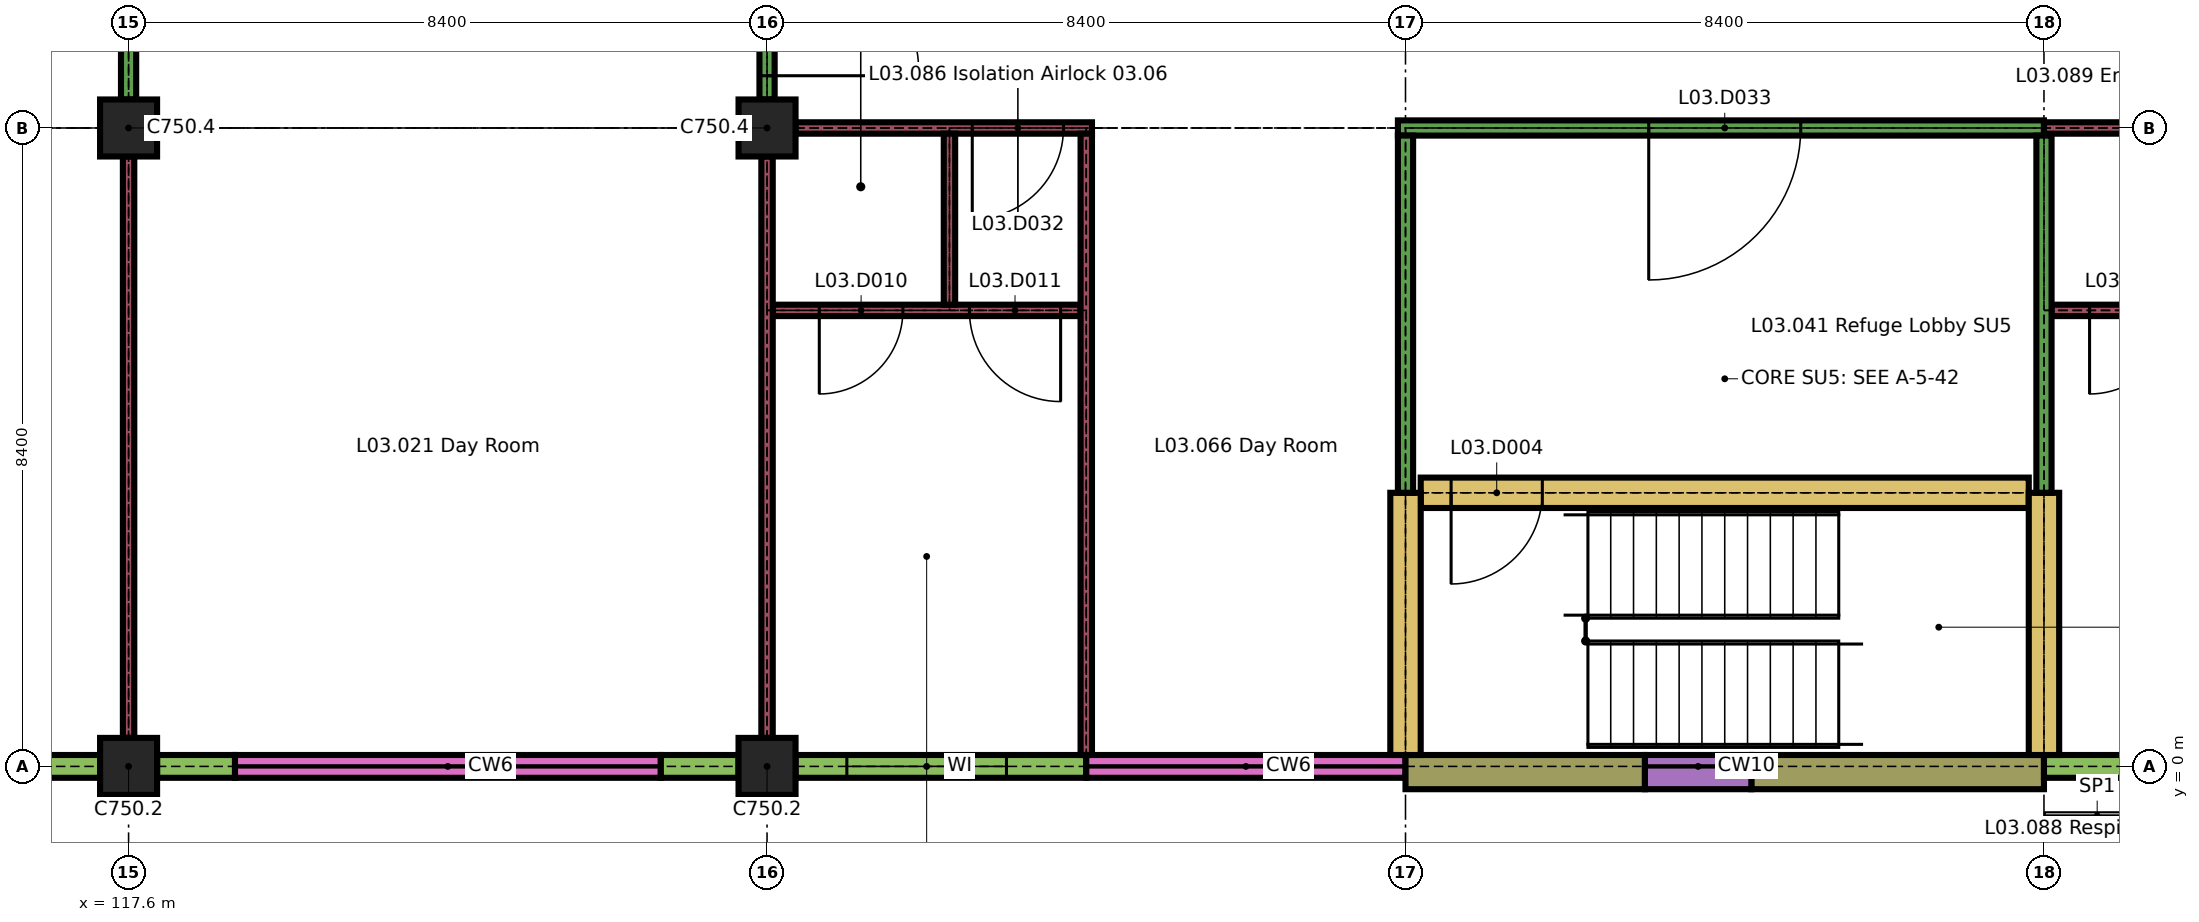
"""IFC4 building model, lengths in metres.
Left out: names, types, materials, properties, quantities, classifications, styles, units other than length and angle.
Written with IfcOpenShell. Run it as: python <this file> out.ifc"""

import sys

from ifc_helpers import new_model, si_unit, direction, frame, frame_2d, origin, origin_2d, place, context, subcontext, project, spatial, rectangle, extrude, element, fill, save


model = new_model("IFC4")
c1 = context("Model", 3, precision=1e-05, world=origin(), true_north=direction((0.0, 1.0)))
c2 = subcontext(c1, "Body", "Model", "MODEL_VIEW")
j1 = project(units=[si_unit("LENGTHUNIT", "METRE"), si_unit("PLANEANGLEUNIT", "RADIAN")], contexts=[c1])
p1 = place(None, origin())
s1 = spatial("IfcSite", under=j1, at=p1, CompositionType="ELEMENT")
p2 = place(p1, origin())
s2 = spatial("IfcBuilding", under=s1, at=p2, CompositionType="ELEMENT")
p3 = place(p2, frame((0.0, 0.0, 15.3)))
s3 = spatial("IfcBuildingStorey", under=s2, at=p3, CompositionType="ELEMENT", Elevation=15.3)
for number, where, z_axis, x_axis in (
    (1, (117.6, 0.0, 0.0), (0.0, 0.0, 1.0), (1.0, 0.0, 0.0)),
    (2, (126.0, 0.0, 0.0), (0.0, 0.0, 1.0), (1.0, 0.0, 0.0)),
    (3, (117.6, 8.4, 0.0), (0.0, 0.0, 1.0), (1.0, 0.0, 0.0)),
    (4, (126.0, 8.4, 0.0), (0.0, 0.0, 1.0), (1.0, 0.0, 0.0)),
):
    element("IfcColumn", number, at=place(p3, frame(where, z_axis=z_axis, x_axis=x_axis)), inside=s3, PredefinedType="COLUMN", context=c2, shape_type="SweptSolid", body=[
        extrude(rectangle(XDim=0.75, YDim=0.75, at=origin_2d()), origin(), (0.0, 0.0, 1.0), 3.26),
    ])
p4 = place(p3, frame((116.1, 0.0, 0.0), z_axis=(0.0, 0.0, 1.0), x_axis=(1.0, 0.0, 0.0)))
e5 = element("IfcWall", 5, at=p4, inside=s3, PredefinedType="SOLIDWALL", context=c2, shape_type="SweptSolid", body=[
    extrude(rectangle(XDim=1.125, YDim=0.3, at=frame_2d((0.562, 0.0))), origin(), (0.0, 0.0, 1.0), 2.96),
])
for number, where, z_axis, x_axis in (
    (6, (117.975, 0.0, 0.0), (0.0, 0.0, 1.0), (1.0, 0.0, 0.0)),
    (7, (124.6, 0.0, 0.0), (0.0, 0.0, 1.0), (1.0, 0.0, 0.0)),
):
    element("IfcWall", number, at=place(p3, frame(where, z_axis=z_axis, x_axis=x_axis)), inside=s3, PredefinedType="SOLIDWALL", context=c2, shape_type="SweptSolid", body=[
        extrude(rectangle(XDim=1.025, YDim=0.3, at=frame_2d((0.512, 0.0))), origin(), (0.0, 0.0, 1.0), 2.96),
    ])
p5 = place(p3, frame((119.0, 0.0, 0.0), z_axis=(0.0, 0.0, 1.0), x_axis=(1.0, 0.0, 0.0)))
e8 = element("IfcWall", 8, at=p5, inside=s3, PredefinedType="SOLIDWALL", context=c2, shape_type="SweptSolid", body=[
    extrude(rectangle(XDim=5.6, YDim=0.3, at=frame_2d((2.8, 0.0))), origin(), (0.0, 0.0, 1.0), 0.6),
])
p6 = place(p3, frame((126.375, 0.0, 0.0), z_axis=(0.0, 0.0, 1.0), x_axis=(1.0, 0.0, 0.0)))
e9 = element("IfcWall", 9, at=p6, inside=s3, PredefinedType="SOLIDWALL", context=c2, shape_type="SweptSolid", body=[
    extrude(rectangle(XDim=3.825, YDim=0.3, at=frame_2d((1.913, 0.0))), origin(), (0.0, 0.0, 1.0), 2.96),
])
p7 = place(p6, frame((0.675, 0.0, 0.9)))
e10 = element("IfcOpeningElement", 10, at=p7, cuts=e9, PredefinedType="OPENING", context=c2, shape_type="SweptSolid", body=[
    extrude(rectangle(XDim=2.1, YDim=1.5, at=frame_2d((1.05, 0.75))), frame((0.0, 0.16, 0.0), z_axis=(0.0, -1.0, 0.0), x_axis=(1.0, 0.0, 0.0)), (0.0, 0.0, 1.0), 0.32),
])
p8 = place(p3, frame((130.2, 0.0, 0.0), z_axis=(0.0, 0.0, 1.0), x_axis=(1.0, 0.0, 0.0)))
e11 = element("IfcWall", 11, at=p8, inside=s3, PredefinedType="SOLIDWALL", context=c2, shape_type="SweptSolid", body=[
    extrude(rectangle(XDim=4.2, YDim=0.3, at=frame_2d((2.1, 0.0))), origin(), (0.0, 0.0, 1.0), 0.6),
])
p9 = place(p3, frame((134.4, -0.075, 0.0), z_axis=(0.0, 0.0, 1.0), x_axis=(1.0, 0.0, 0.0)))
e12 = element("IfcWall", 12, at=p9, inside=s3, PredefinedType="SOLIDWALL", context=c2, shape_type="SweptSolid", body=[
    extrude(rectangle(XDim=3.15, YDim=0.45, at=frame_2d((1.575, 0.0))), origin(), (0.0, 0.0, 1.0), 3.26),
])
p10 = place(p3, frame((138.95, -0.075, 0.0), z_axis=(0.0, 0.0, 1.0), x_axis=(1.0, 0.0, 0.0)))
e13 = element("IfcWall", 13, at=p10, inside=s3, PredefinedType="SOLIDWALL", context=c2, shape_type="SweptSolid", body=[
    extrude(rectangle(XDim=3.85, YDim=0.45, at=frame_2d((1.925, 0.0))), origin(), (0.0, 0.0, 1.0), 3.26),
])
p11 = place(p3, frame((137.55, -0.075, 0.0), z_axis=(0.0, 0.0, 1.0), x_axis=(1.0, 0.0, 0.0)))
e14 = element("IfcWall", 14, at=p11, inside=s3, PredefinedType="SOLIDWALL", context=c2, shape_type="SweptSolid", body=[
    extrude(rectangle(XDim=1.4, YDim=0.45, at=frame_2d((0.7, 0.0))), origin(), (0.0, 0.0, 1.0), 0.6),
])
p12 = place(p3, frame((142.8, 0.0, 0.0), z_axis=(0.0, 0.0, 1.0), x_axis=(1.0, 0.0, 0.0)))
e15 = element("IfcWall", 15, at=p12, inside=s3, PredefinedType="SOLIDWALL", context=c2, shape_type="SweptSolid", body=[
    extrude(rectangle(XDim=4.2, YDim=0.3, at=frame_2d((2.1, 0.0))), origin(), (0.0, 0.0, 1.0), 2.96),
])
p13 = place(p12, frame((1.05, 0.0, 0.9)))
e16 = element("IfcOpeningElement", 16, at=p13, cuts=e15, PredefinedType="OPENING", context=c2, shape_type="SweptSolid", body=[
    extrude(rectangle(XDim=2.1, YDim=1.5, at=frame_2d((1.05, 0.75))), frame((0.0, 0.16, 0.0), z_axis=(0.0, -1.0, 0.0), x_axis=(1.0, 0.0, 0.0)), (0.0, 0.0, 1.0), 0.32),
])
p14 = place(p3, frame((134.6, 3.6, 0.0), z_axis=(0.0, 0.0, 1.0), x_axis=(1.0, 0.0, 0.0)))
e17 = element("IfcWall", 17, at=p14, inside=s3, PredefinedType="SHEAR", context=c2, shape_type="SweptSolid", body=[
    extrude(rectangle(XDim=8.0, YDim=0.4, at=frame_2d((4.0, 0.0))), origin(), (0.0, 0.0, 1.0), 3.26),
])
p15 = place(p14, frame((0.4, 0.0, 0.0)))
e18 = element("IfcOpeningElement", 18, at=p15, cuts=e17, PredefinedType="OPENING", context=c2, shape_type="SweptSolid", body=[
    extrude(rectangle(XDim=1.2, YDim=2.1, at=frame_2d((0.6, 1.05))), frame((0.0, 0.21, 0.0), z_axis=(0.0, -1.0, 0.0), x_axis=(1.0, 0.0, 0.0)), (0.0, 0.0, 1.0), 0.42),
])
p16 = place(p3, frame((126.075, 6.0, 0.0), z_axis=(0.0, 0.0, 1.0), x_axis=(1.0, 0.0, 0.0)))
e19 = element("IfcWall", 19, at=p16, inside=s3, PredefinedType="PARTITIONING", context=c2, shape_type="SweptSolid", body=[
    extrude(rectangle(XDim=4.05, YDim=0.15, at=frame_2d((2.025, 0.0))), origin(), (0.0, 0.0, 1.0), 3.26),
])
p17 = place(p16, frame((0.613, 0.0, 0.0)))
e20 = element("IfcOpeningElement", 20, at=p17, cuts=e19, PredefinedType="OPENING", context=c2, shape_type="SweptSolid", body=[
    extrude(rectangle(XDim=1.1, YDim=2.1, at=frame_2d((0.55, 1.05))), frame((0.0, 0.085, 0.0), z_axis=(0.0, -1.0, 0.0), x_axis=(1.0, 0.0, 0.0)), (0.0, 0.0, 1.0), 0.17),
])
p18 = place(p16, frame((2.587, 0.0, 0.0)))
e21 = element("IfcOpeningElement", 21, at=p18, cuts=e19, PredefinedType="OPENING", context=c2, shape_type="SweptSolid", body=[
    extrude(rectangle(XDim=1.2, YDim=2.1, at=frame_2d((0.6, 1.05))), frame((0.0, 0.085, 0.0), z_axis=(0.0, -1.0, 0.0), x_axis=(1.0, 0.0, 0.0)), (0.0, 0.0, 1.0), 0.17),
])
p19 = place(p3, frame((142.9, 6.0, 0.0), z_axis=(0.0, 0.0, 1.0), x_axis=(1.0, 0.0, 0.0)))
e22 = element("IfcWall", 22, at=p19, inside=s3, PredefinedType="PARTITIONING", context=c2, shape_type="SweptSolid", body=[
    extrude(rectangle(XDim=2.175, YDim=0.15, at=frame_2d((1.087, 0.0))), origin(), (0.0, 0.0, 1.0), 3.26),
])
p20 = place(p19, frame((0.5, 0.0, 0.0)))
e23 = element("IfcOpeningElement", 23, at=p20, cuts=e22, PredefinedType="OPENING", context=c2, shape_type="SweptSolid", body=[
    extrude(rectangle(XDim=1.1, YDim=2.1, at=frame_2d((0.55, 1.05))), frame((0.0, 0.085, 0.0), z_axis=(0.0, -1.0, 0.0), x_axis=(1.0, 0.0, 0.0)), (0.0, 0.0, 1.0), 0.17),
])
p21 = place(p3, frame((126.375, 8.4, 0.0), z_axis=(0.0, 0.0, 1.0), x_axis=(1.0, 0.0, 0.0)))
e24 = element("IfcWall", 24, at=p21, inside=s3, PredefinedType="PARTITIONING", context=c2, shape_type="SweptSolid", body=[
    extrude(rectangle(XDim=3.9, YDim=0.15, at=frame_2d((1.95, 0.0))), origin(), (0.0, 0.0, 1.0), 3.26),
])
p22 = place(p21, frame((2.325, 0.0, 0.0)))
e25 = element("IfcOpeningElement", 25, at=p22, cuts=e24, PredefinedType="OPENING", context=c2, shape_type="SweptSolid", body=[
    extrude(rectangle(XDim=1.2, YDim=2.1, at=frame_2d((0.6, 1.05))), frame((0.0, 0.085, 0.0), z_axis=(0.0, -1.0, 0.0), x_axis=(1.0, 0.0, 0.0)), (0.0, 0.0, 1.0), 0.17),
])
p23 = place(p3, frame((134.3, 8.4, 0.0), z_axis=(0.0, 0.0, 1.0), x_axis=(1.0, 0.0, 0.0)))
e26 = element("IfcWall", 26, at=p23, inside=s3, PredefinedType="PARTITIONING", context=c2, shape_type="SweptSolid", body=[
    extrude(rectangle(XDim=8.5, YDim=0.2, at=frame_2d((4.25, 0.0))), origin(), (0.0, 0.0, 1.0), 3.26),
])
p24 = place(p23, frame((3.3, 0.0, 0.0)))
e27 = element("IfcOpeningElement", 27, at=p24, cuts=e26, PredefinedType="OPENING", context=c2, shape_type="SweptSolid", body=[
    extrude(rectangle(XDim=2.0, YDim=2.4, at=frame_2d((1.0, 1.2))), frame((0.0, 0.11, 0.0), z_axis=(0.0, -1.0, 0.0), x_axis=(1.0, 0.0, 0.0)), (0.0, 0.0, 1.0), 0.22),
])
p25 = place(p3, frame((142.8, 8.4, 0.0), z_axis=(0.0, 0.0, 1.0), x_axis=(1.0, 0.0, 0.0)))
e28 = element("IfcWall", 28, at=p25, inside=s3, PredefinedType="PARTITIONING", context=c2, shape_type="SweptSolid", body=[
    extrude(rectangle(XDim=8.05, YDim=0.15, at=frame_2d((4.025, 0.0))), origin(), (0.0, 0.0, 1.0), 3.26),
])
p26 = place(p25, frame((2.45, 0.0, 0.0)))
e29 = element("IfcOpeningElement", 29, at=p26, cuts=e28, PredefinedType="OPENING", context=c2, shape_type="SweptSolid", body=[
    extrude(rectangle(XDim=1.5, YDim=2.4, at=frame_2d((0.75, 1.2))), frame((0.0, 0.085, 0.0), z_axis=(0.0, -1.0, 0.0), x_axis=(1.0, 0.0, 0.0)), (0.0, 0.0, 1.0), 0.17),
])
p27 = place(p25, frame((4.5, 0.0, 0.0)))
e30 = element("IfcOpeningElement", 30, at=p27, cuts=e28, PredefinedType="OPENING", context=c2, shape_type="SweptSolid", body=[
    extrude(rectangle(XDim=1.2, YDim=2.1, at=frame_2d((0.6, 1.05))), frame((0.0, 0.085, 0.0), z_axis=(0.0, -1.0, 0.0), x_axis=(1.0, 0.0, 0.0)), (0.0, 0.0, 1.0), 0.17),
])
p28 = place(p3, frame((117.6, 0.375, 0.0), z_axis=(0.0, 0.0, 1.0), x_axis=(0.0, 1.0, 0.0)))
e31 = element("IfcWall", 31, at=p28, inside=s3, PredefinedType="PARTITIONING", context=c2, shape_type="SweptSolid", body=[
    extrude(rectangle(XDim=7.65, YDim=0.15, at=frame_2d((3.825, 0.0))), origin(), (0.0, 0.0, 1.0), 3.26),
])
p29 = place(p3, frame((117.6, 8.775, 0.0), z_axis=(0.0, 0.0, 1.0), x_axis=(0.0, 1.0, 0.0)))
e32 = element("IfcWall", 32, at=p29, inside=s3, PredefinedType="PARTITIONING", context=c2, shape_type="SweptSolid", body=[
    extrude(rectangle(XDim=12.825, YDim=0.2, at=frame_2d((6.413, 0.0))), origin(), (0.0, 0.0, 1.0), 3.26),
])
p30 = place(p29, frame((3.163, 0.0, 0.0)))
e33 = element("IfcOpeningElement", 33, at=p30, cuts=e32, PredefinedType="OPENING", context=c2, shape_type="SweptSolid", body=[
    extrude(rectangle(XDim=1.7, YDim=2.4, at=frame_2d((0.85, 1.2))), frame((0.0, 0.11, 0.0), z_axis=(0.0, -1.0, 0.0), x_axis=(1.0, 0.0, 0.0)), (0.0, 0.0, 1.0), 0.22),
])
p31 = place(p3, frame((126.0, 0.375, 0.0), z_axis=(0.0, 0.0, 1.0), x_axis=(0.0, 1.0, 0.0)))
e34 = element("IfcWall", 34, at=p31, inside=s3, PredefinedType="PARTITIONING", context=c2, shape_type="SweptSolid", body=[
    extrude(rectangle(XDim=7.65, YDim=0.15, at=frame_2d((3.825, 0.0))), origin(), (0.0, 0.0, 1.0), 3.26),
])
p32 = place(p3, frame((126.0, 8.775, 0.0), z_axis=(0.0, 0.0, 1.0), x_axis=(0.0, 1.0, 0.0)))
e35 = element("IfcWall", 35, at=p32, inside=s3, PredefinedType="PARTITIONING", context=c2, shape_type="SweptSolid", body=[
    extrude(rectangle(XDim=7.925, YDim=0.2, at=frame_2d((3.962, 0.0))), origin(), (0.0, 0.0, 1.0), 3.26),
])
p33 = place(p32, frame((0.312, 0.0, 0.0)))
e36 = element("IfcOpeningElement", 36, at=p33, cuts=e35, PredefinedType="OPENING", context=c2, shape_type="SweptSolid", body=[
    extrude(rectangle(XDim=2.0, YDim=2.4, at=frame_2d((1.0, 1.2))), frame((0.0, 0.11, 0.0), z_axis=(0.0, -1.0, 0.0), x_axis=(1.0, 0.0, 0.0)), (0.0, 0.0, 1.0), 0.22),
])
p34 = place(p32, frame((5.475, 0.0, 0.0)))
e37 = element("IfcOpeningElement", 37, at=p34, cuts=e35, PredefinedType="OPENING", context=c2, shape_type="SweptSolid", body=[
    extrude(rectangle(XDim=2.0, YDim=2.4, at=frame_2d((1.0, 1.2))), frame((0.0, 0.11, 0.0), z_axis=(0.0, -1.0, 0.0), x_axis=(1.0, 0.0, 0.0)), (0.0, 0.0, 1.0), 0.22),
])
p35 = place(p3, frame((128.4, 6.075, 0.0), z_axis=(0.0, 0.0, 1.0), x_axis=(0.0, 1.0, 0.0)))
e38 = element("IfcWall", 38, at=p35, inside=s3, PredefinedType="PARTITIONING", context=c2, shape_type="SweptSolid", body=[
    extrude(rectangle(XDim=2.25, YDim=0.15, at=frame_2d((1.125, 0.0))), origin(), (0.0, 0.0, 1.0), 3.26),
])
p36 = place(p3, frame((130.2, 0.15, 0.0), z_axis=(0.0, 0.0, 1.0), x_axis=(0.0, 1.0, 0.0)))
e39 = element("IfcWall", 39, at=p36, inside=s3, PredefinedType="PARTITIONING", context=c2, shape_type="SweptSolid", body=[
    extrude(rectangle(XDim=8.175, YDim=0.15, at=frame_2d((4.087, 0.0))), origin(), (0.0, 0.0, 1.0), 3.26),
])
p37 = place(p3, frame((134.4, 0.15, 0.0), z_axis=(0.0, 0.0, 1.0), x_axis=(0.0, 1.0, 0.0)))
e40 = element("IfcWall", 40, at=p37, inside=s3, PredefinedType="SHEAR", context=c2, shape_type="SweptSolid", body=[
    extrude(rectangle(XDim=3.45, YDim=0.4, at=frame_2d((1.725, 0.0))), origin(), (0.0, 0.0, 1.0), 3.26),
])
p38 = place(p3, frame((134.4, 3.6, 0.0), z_axis=(0.0, 0.0, 1.0), x_axis=(0.0, 1.0, 0.0)))
e41 = element("IfcWall", 41, at=p38, inside=s3, PredefinedType="PARTITIONING", context=c2, shape_type="SweptSolid", body=[
    extrude(rectangle(XDim=4.7, YDim=0.2, at=frame_2d((2.35, 0.0))), origin(), (0.0, 0.0, 1.0), 3.26),
])
p39 = place(p3, frame((142.8, 0.15, 0.0), z_axis=(0.0, 0.0, 1.0), x_axis=(0.0, 1.0, 0.0)))
e42 = element("IfcWall", 42, at=p39, inside=s3, PredefinedType="SHEAR", context=c2, shape_type="SweptSolid", body=[
    extrude(rectangle(XDim=3.45, YDim=0.4, at=frame_2d((1.725, 0.0))), origin(), (0.0, 0.0, 1.0), 3.26),
])
p40 = place(p3, frame((142.8, 3.6, 0.0), z_axis=(0.0, 0.0, 1.0), x_axis=(0.0, 1.0, 0.0)))
e43 = element("IfcWall", 43, at=p40, inside=s3, PredefinedType="PARTITIONING", context=c2, shape_type="SweptSolid", body=[
    extrude(rectangle(XDim=4.7, YDim=0.2, at=frame_2d((2.35, 0.0))), origin(), (0.0, 0.0, 1.0), 3.26),
])
p41 = place(p7, origin())
e44 = element("IfcWindow", 44, at=p41, inside=s3, PartitioningType="SINGLE_PANEL", PredefinedType="WINDOW", context=c2, shape_type="SweptSolid", body=[
    extrude(rectangle(XDim=2.1, YDim=1.5, at=frame_2d((1.05, 0.75))), frame((0.0, 0.045, 0.0), z_axis=(0.0, -1.0, 0.0), x_axis=(1.0, 0.0, 0.0)), (0.0, 0.0, 1.0), 0.09),
])
fill(e10, e44)
p42 = place(p15, origin())
e45 = element("IfcDoor", 45, at=p42, inside=s3, OperationType="SINGLE_SWING_LEFT", PredefinedType="DOOR", context=c2, shape_type="SweptSolid", body=[
    extrude(rectangle(XDim=1.2, YDim=2.1, at=frame_2d((0.6, 1.05))), frame((0.0, 0.025, 0.0), z_axis=(0.0, -1.0, 0.0), x_axis=(1.0, 0.0, 0.0)), (0.0, 0.0, 1.0), 0.05),
])
fill(e18, e45)
p43 = place(p17, origin())
e46 = element("IfcDoor", 46, at=p43, inside=s3, OperationType="SINGLE_SWING_LEFT", PredefinedType="DOOR", context=c2, shape_type="SweptSolid", body=[
    extrude(rectangle(XDim=1.1, YDim=2.1, at=frame_2d((0.55, 1.05))), frame((0.0, 0.025, 0.0), z_axis=(0.0, -1.0, 0.0), x_axis=(1.0, 0.0, 0.0)), (0.0, 0.0, 1.0), 0.05),
])
fill(e20, e46)
p44 = place(p18, origin())
e47 = element("IfcDoor", 47, at=p44, inside=s3, OperationType="SINGLE_SWING_RIGHT", PredefinedType="DOOR", context=c2, shape_type="SweptSolid", body=[
    extrude(rectangle(XDim=1.2, YDim=2.1, at=frame_2d((0.6, 1.05))), frame((0.0, 0.05, 0.0), z_axis=(0.0, -1.0, 0.0), x_axis=(1.0, 0.0, 0.0)), (0.0, 0.0, 1.0), 0.1),
])
fill(e21, e47)
p45 = place(p20, origin())
e48 = element("IfcDoor", 48, at=p45, inside=s3, OperationType="SINGLE_SWING_LEFT", PredefinedType="DOOR", context=c2, shape_type="SweptSolid", body=[
    extrude(rectangle(XDim=1.1, YDim=2.1, at=frame_2d((0.55, 1.05))), frame((0.0, 0.025, 0.0), z_axis=(0.0, -1.0, 0.0), x_axis=(1.0, 0.0, 0.0)), (0.0, 0.0, 1.0), 0.05),
])
fill(e23, e48)
p46 = place(p22, origin())
e49 = element("IfcDoor", 49, at=p46, inside=s3, OperationType="SINGLE_SWING_LEFT", PredefinedType="DOOR", context=c2, shape_type="SweptSolid", body=[
    extrude(rectangle(XDim=1.2, YDim=2.1, at=frame_2d((0.6, 1.05))), frame((0.0, 0.05, 0.0), z_axis=(0.0, -1.0, 0.0), x_axis=(1.0, 0.0, 0.0)), (0.0, 0.0, 1.0), 0.1),
])
fill(e25, e49)
p47 = place(p24, origin())
e50 = element("IfcDoor", 50, at=p47, inside=s3, OperationType="SINGLE_SWING_LEFT", PredefinedType="DOOR", context=c2, shape_type="SweptSolid", body=[
    extrude(rectangle(XDim=2.0, YDim=2.4, at=frame_2d((1.0, 1.2))), frame((0.0, 0.03, 0.0), z_axis=(0.0, -1.0, 0.0), x_axis=(1.0, 0.0, 0.0)), (0.0, 0.0, 1.0), 0.06),
])
fill(e27, e50)
p48 = place(p33, origin())
e51 = element("IfcDoor", 51, at=p48, inside=s3, OperationType="SINGLE_SWING_LEFT", PredefinedType="DOOR", context=c2, shape_type="SweptSolid", body=[
    extrude(rectangle(XDim=2.0, YDim=2.4, at=frame_2d((1.0, 1.2))), frame((0.0, 0.03, 0.0), z_axis=(0.0, -1.0, 0.0), x_axis=(1.0, 0.0, 0.0)), (0.0, 0.0, 1.0), 0.06),
])
fill(e36, e51)
save(model, sys.argv[1])
